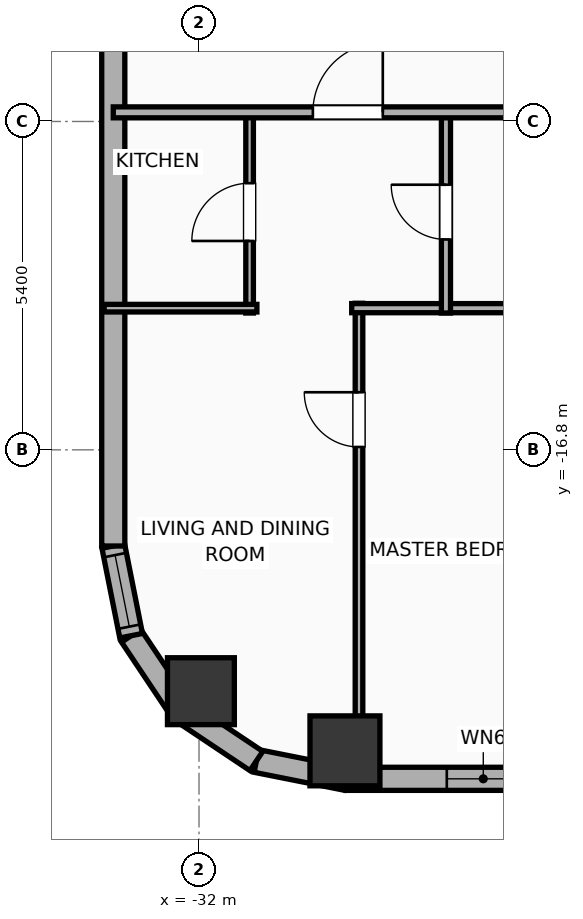
"""IFC4 building model, lengths in metres.
Left out: names, types, materials, properties, quantities, classifications, styles, units other than length and angle.
Written with IfcOpenShell. Run it as: python <this file> out.ifc"""

import sys

from ifc_helpers import new_model, si_unit, direction, frame, frame_2d, origin, origin_2d, place, context, subcontext, project, spatial, rectangle, hollow_rectangle, hollow_circle, extrude, element, fill, save


model = new_model("IFC4")
c1 = context("Model", 3, precision=1e-05, world=origin(), true_north=direction((0.0, 1.0)))
c2 = subcontext(c1, "Body", "Model", "MODEL_VIEW")
j1 = project(units=[si_unit("LENGTHUNIT", "METRE"), si_unit("PLANEANGLEUNIT", "RADIAN")], contexts=[c1])
p1 = place(None, origin())
s1 = spatial("IfcSite", under=j1, at=p1, CompositionType="ELEMENT")
p2 = place(p1, origin())
s2 = spatial("IfcBuilding", under=s1, at=p2, CompositionType="ELEMENT")
p3 = place(p2, frame((0.0, 0.0, 76.7)))
s3 = spatial("IfcBuildingStorey", under=s2, at=p3, CompositionType="ELEMENT", Elevation=76.7)
p4 = place(p3, frame((-29.6, -21.75, 0.0), z_axis=(0.0, 0.0, 1.0), x_axis=(1.0, 0.0, 0.0)))
e1 = element("IfcColumn", 1, at=p4, inside=s3, PredefinedType="COLUMN", context=c2, shape_type="SweptSolid", body=[
    extrude(hollow_rectangle(XDim=1.15, YDim=1.15, WallThickness=0.04, at=origin_2d()), origin(), (0.0, 0.0, 1.0), 3.9),
])
p5 = place(p3, frame((-31.969, -20.769, 0.0), z_axis=(0.0, 0.0, 1.0), x_axis=(1.0, 0.0, 0.0)))
e2 = element("IfcColumn", 2, at=p5, inside=s3, PredefinedType="COLUMN", context=c2, shape_type="SweptSolid", body=[
    extrude(hollow_circle(Radius=0.55, WallThickness=0.036, at=origin_2d()), origin(), (0.0, 0.0, 1.0), 3.9),
])
p6 = place(p3, frame((22.381, -22.21, 0.0), z_axis=(0.0, 0.0, 1.0), x_axis=(-1.0, 0.0, 0.0)))
e3 = element("IfcWall", 3, at=p6, inside=s3, PredefinedType="ELEMENTEDWALL", context=c2, shape_type="SweptSolid", body=[
    extrude(rectangle(XDim=51.963, YDim=0.38, at=frame_2d((25.981, 0.0))), origin(), (0.0, 0.0, 1.0), 3.6),
])
p7 = place(p6, frame((5.81, 0.0, 0.75)))
e4 = element("IfcOpeningElement", 4, at=p7, cuts=e3, PredefinedType="OPENING", context=c2, shape_type="SweptSolid", body=[
    extrude(rectangle(XDim=2.4, YDim=2.1, at=frame_2d((1.2, 1.05))), frame((0.0, 0.2, 0.0), z_axis=(0.0, -1.0, 0.0), x_axis=(1.0, 0.0, 0.0)), (0.0, 0.0, 1.0), 0.4),
])
p8 = place(p6, frame((49.106, 0.0, 0.75)))
e5 = element("IfcOpeningElement", 5, at=p8, cuts=e3, PredefinedType="OPENING", context=c2, shape_type="SweptSolid", body=[
    extrude(rectangle(XDim=1.2, YDim=2.05, at=frame_2d((0.6, 1.025))), frame((0.0, 0.2, 0.0), z_axis=(0.0, -1.0, 0.0), x_axis=(1.0, 0.0, 0.0)), (0.0, 0.0, 1.0), 0.4),
])
p9 = place(p6, frame((45.716, 0.0, 0.75)))
e6 = element("IfcOpeningElement", 6, at=p9, cuts=e3, PredefinedType="OPENING", context=c2, shape_type="SweptSolid", body=[
    extrude(rectangle(XDim=1.2, YDim=2.05, at=frame_2d((0.6, 1.025))), frame((0.0, 0.2, 0.0), z_axis=(0.0, -1.0, 0.0), x_axis=(1.0, 0.0, 0.0)), (0.0, 0.0, 1.0), 0.4),
])
p10 = place(p6, frame((42.346, 0.0, 0.75)))
e7 = element("IfcOpeningElement", 7, at=p10, cuts=e3, PredefinedType="OPENING", context=c2, shape_type="SweptSolid", body=[
    extrude(rectangle(XDim=1.2, YDim=2.05, at=frame_2d((0.6, 1.025))), frame((0.0, 0.2, 0.0), z_axis=(0.0, -1.0, 0.0), x_axis=(1.0, 0.0, 0.0)), (0.0, 0.0, 1.0), 0.4),
])
p11 = place(p6, frame((35.811, 0.0, 0.75)))
e8 = element("IfcOpeningElement", 8, at=p11, cuts=e3, PredefinedType="OPENING", context=c2, shape_type="SweptSolid", body=[
    extrude(rectangle(XDim=1.2, YDim=2.05, at=frame_2d((0.6, 1.025))), frame((0.0, 0.2, 0.0), z_axis=(0.0, -1.0, 0.0), x_axis=(1.0, 0.0, 0.0)), (0.0, 0.0, 1.0), 0.4),
])
p12 = place(p6, frame((39.061, 0.0, 0.75)))
e9 = element("IfcOpeningElement", 9, at=p12, cuts=e3, PredefinedType="OPENING", context=c2, shape_type="SweptSolid", body=[
    extrude(rectangle(XDim=1.2, YDim=2.05, at=frame_2d((0.6, 1.025))), frame((0.0, 0.2, 0.0), z_axis=(0.0, -1.0, 0.0), x_axis=(1.0, 0.0, 0.0)), (0.0, 0.0, 1.0), 0.4),
])
p13 = place(p6, frame((29.211, 0.0, 0.75)))
e10 = element("IfcOpeningElement", 10, at=p13, cuts=e3, PredefinedType="OPENING", context=c2, shape_type="SweptSolid", body=[
    extrude(rectangle(XDim=1.2, YDim=2.05, at=frame_2d((0.6, 1.025))), frame((0.0, 0.2, 0.0), z_axis=(0.0, -1.0, 0.0), x_axis=(1.0, 0.0, 0.0)), (0.0, 0.0, 1.0), 0.4),
])
p14 = place(p6, frame((22.757, 0.0, 0.75)))
e11 = element("IfcOpeningElement", 11, at=p14, cuts=e3, PredefinedType="OPENING", context=c2, shape_type="SweptSolid", body=[
    extrude(rectangle(XDim=1.2, YDim=2.05, at=frame_2d((0.6, 1.025))), frame((0.0, 0.2, 0.0), z_axis=(0.0, -1.0, 0.0), x_axis=(1.0, 0.0, 0.0)), (0.0, 0.0, 1.0), 0.4),
])
p15 = place(p6, frame((26.007, 0.0, 0.75)))
e12 = element("IfcOpeningElement", 12, at=p15, cuts=e3, PredefinedType="OPENING", context=c2, shape_type="SweptSolid", body=[
    extrude(rectangle(XDim=1.2, YDim=2.05, at=frame_2d((0.6, 1.025))), frame((0.0, 0.2, 0.0), z_axis=(0.0, -1.0, 0.0), x_axis=(1.0, 0.0, 0.0)), (0.0, 0.0, 1.0), 0.4),
])
p16 = place(p6, frame((18.697, 0.0, 0.75)))
e13 = element("IfcOpeningElement", 13, at=p16, cuts=e3, PredefinedType="OPENING", context=c2, shape_type="SweptSolid", body=[
    extrude(rectangle(XDim=1.2, YDim=2.05, at=frame_2d((0.6, 1.025))), frame((0.0, 0.2, 0.0), z_axis=(0.0, -1.0, 0.0), x_axis=(1.0, 0.0, 0.0)), (0.0, 0.0, 1.0), 0.4),
])
p17 = place(p6, frame((15.447, 0.0, 0.75)))
e14 = element("IfcOpeningElement", 14, at=p17, cuts=e3, PredefinedType="OPENING", context=c2, shape_type="SweptSolid", body=[
    extrude(rectangle(XDim=1.2, YDim=2.05, at=frame_2d((0.6, 1.025))), frame((0.0, 0.2, 0.0), z_axis=(0.0, -1.0, 0.0), x_axis=(1.0, 0.0, 0.0)), (0.0, 0.0, 1.0), 0.4),
])
p18 = place(p6, frame((11.162, 0.0, 0.75)))
e15 = element("IfcOpeningElement", 15, at=p18, cuts=e3, PredefinedType="OPENING", context=c2, shape_type="SweptSolid", body=[
    extrude(rectangle(XDim=1.2, YDim=2.05, at=frame_2d((0.6, 1.025))), frame((0.0, 0.2, 0.0), z_axis=(0.0, -1.0, 0.0), x_axis=(1.0, 0.0, 0.0)), (0.0, 0.0, 1.0), 0.4),
])
p19 = place(p6, frame((2.974, 0.0, 0.75)))
e16 = element("IfcOpeningElement", 16, at=p19, cuts=e3, PredefinedType="OPENING", context=c2, shape_type="SweptSolid", body=[
    extrude(rectangle(XDim=1.2, YDim=2.05, at=frame_2d((0.6, 1.025))), frame((0.0, 0.2, 0.0), z_axis=(0.0, -1.0, 0.0), x_axis=(1.0, 0.0, 0.0)), (0.0, 0.0, 1.0), 0.4),
])
p20 = place(p6, frame((0.927, 0.0, 0.75)))
e17 = element("IfcOpeningElement", 17, at=p20, cuts=e3, PredefinedType="OPENING", context=c2, shape_type="SweptSolid", body=[
    extrude(rectangle(XDim=1.2, YDim=2.05, at=frame_2d((0.6, 1.025))), frame((0.0, 0.2, 0.0), z_axis=(0.0, -1.0, 0.0), x_axis=(1.0, 0.0, 0.0)), (0.0, 0.0, 1.0), 0.4),
])
p21 = place(p3, frame((-29.581, -22.21, 0.0), z_axis=(0.0, 0.0, 1.0), x_axis=(-0.980786132421, 0.195086038585, 0.0)))
e18 = element("IfcWall", 18, at=p21, inside=s3, PredefinedType="ELEMENTEDWALL", context=c2, shape_type="SweptSolid", body=[
    extrude(rectangle(XDim=1.504, YDim=0.38, at=frame_2d((0.752, 0.0))), origin(), (0.0, 0.0, 1.0), 3.6),
])
p22 = place(p3, frame((-31.057, -21.917, 0.0), z_axis=(0.0, 0.0, 1.0), x_axis=(-0.831442848281, 0.555610286119, 0.0)))
e19 = element("IfcWall", 19, at=p22, inside=s3, PredefinedType="ELEMENTEDWALL", context=c2, shape_type="SweptSolid", body=[
    extrude(rectangle(XDim=1.485, YDim=0.38, at=frame_2d((0.743, 0.0))), origin(), (0.0, 0.0, 1.0), 3.6),
])
p23 = place(p3, frame((-32.292, -21.091, 0.0), z_axis=(0.0, 0.0, 1.0), x_axis=(-0.555572577804, 0.831468045563, 0.0)))
e20 = element("IfcWall", 20, at=p23, inside=s3, PredefinedType="ELEMENTEDWALL", context=c2, shape_type="SweptSolid", body=[
    extrude(rectangle(XDim=1.485, YDim=0.38, at=frame_2d((0.742, 0.0))), origin(), (0.0, 0.0, 1.0), 3.6),
])
p24 = place(p3, frame((-33.116, -19.857, 0.0), z_axis=(0.0, 0.0, 1.0), x_axis=(-0.195086038585, 0.980786132421, 0.0)))
e21 = element("IfcWall", 21, at=p24, inside=s3, PredefinedType="ELEMENTEDWALL", context=c2, shape_type="SweptSolid", body=[
    extrude(rectangle(XDim=1.504, YDim=0.38, at=frame_2d((0.752, 0.0))), origin(), (0.0, 0.0, 1.0), 3.6),
])
p25 = place(p24, frame((0.152, 0.0, 0.75)))
e22 = element("IfcOpeningElement", 22, at=p25, cuts=e21, PredefinedType="OPENING", context=c2, shape_type="SweptSolid", body=[
    extrude(rectangle(XDim=1.2, YDim=2.05, at=frame_2d((0.6, 1.025))), frame((0.0, 0.2, 0.0), z_axis=(0.0, -1.0, 0.0), x_axis=(1.0, 0.0, 0.0)), (0.0, 0.0, 1.0), 0.4),
])
p26 = place(p3, frame((-33.41, -18.381, 0.0), z_axis=(0.0, 0.0, 1.0), x_axis=(0.0, 1.0, 0.0)))
e23 = element("IfcWall", 23, at=p26, inside=s3, PredefinedType="ELEMENTEDWALL", context=c2, shape_type="SweptSolid", body=[
    extrude(rectangle(XDim=36.763, YDim=0.38, at=frame_2d((18.381, 0.0))), origin(), (0.0, 0.0, 1.0), 3.6),
])
p27 = place(p26, frame((33.762, 0.0, 0.75)))
e24 = element("IfcOpeningElement", 24, at=p27, cuts=e23, PredefinedType="OPENING", context=c2, shape_type="SweptSolid", body=[
    extrude(rectangle(XDim=1.2, YDim=2.05, at=frame_2d((0.6, 1.025))), frame((0.0, 0.2, 0.0), z_axis=(0.0, -1.0, 0.0), x_axis=(1.0, 0.0, 0.0)), (0.0, 0.0, 1.0), 0.4),
])
p28 = place(p26, frame((22.701, 0.0, 0.75)))
e25 = element("IfcOpeningElement", 25, at=p28, cuts=e23, PredefinedType="OPENING", context=c2, shape_type="SweptSolid", body=[
    extrude(rectangle(XDim=1.2, YDim=2.05, at=frame_2d((0.6, 1.025))), frame((0.0, 0.2, 0.0), z_axis=(0.0, -1.0, 0.0), x_axis=(1.0, 0.0, 0.0)), (0.0, 0.0, 1.0), 0.4),
])
p29 = place(p26, frame((13.001, 0.0, 0.75)))
e26 = element("IfcOpeningElement", 26, at=p29, cuts=e23, PredefinedType="OPENING", context=c2, shape_type="SweptSolid", body=[
    extrude(rectangle(XDim=1.2, YDim=2.05, at=frame_2d((0.6, 1.025))), frame((0.0, 0.2, 0.0), z_axis=(0.0, -1.0, 0.0), x_axis=(1.0, 0.0, 0.0)), (0.0, 0.0, 1.0), 0.4),
])
p30 = place(p3, frame((-29.369, -22.36, 0.0), z_axis=(0.0, 0.0, 1.0), x_axis=(0.0, 1.0, 0.0)))
e27 = element("IfcWall", 27, at=p30, inside=s3, PredefinedType="PARTITIONING", context=c2, shape_type="SweptSolid", body=[
    extrude(rectangle(XDim=7.97, YDim=0.125, at=frame_2d((3.985, 0.0))), origin(), (0.0, 0.0, 1.0), 3.6),
])
p31 = place(p30, frame((5.607, 0.0, 0.0)))
e28 = element("IfcOpeningElement", 28, at=p31, cuts=e27, PredefinedType="OPENING", context=c2, shape_type="SweptSolid", body=[
    extrude(rectangle(XDim=0.9, YDim=2.05, at=frame_2d((0.45, 1.025))), frame((0.0, 0.073, 0.0), z_axis=(0.0, -1.0, 0.0), x_axis=(1.0, 0.0, 0.0)), (0.0, 0.0, 1.0), 0.145),
])
p32 = place(p3, frame((-29.489, -14.47, 0.0), z_axis=(0.0, 0.0, 1.0), x_axis=(1.0, 0.0, 0.0)))
e29 = element("IfcWall", 29, at=p32, inside=s3, PredefinedType="PLUMBINGWALL", context=c2, shape_type="SweptSolid", body=[
    extrude(rectangle(XDim=3.605, YDim=0.15, at=frame_2d((1.802, 0.0))), origin(), (0.0, 0.0, 1.0), 3.6),
])
p33 = place(p3, frame((-31.168, -14.55, 0.0), z_axis=(0.0, 0.0, 1.0), x_axis=(0.0, 1.0, 0.0)))
e30 = element("IfcWall", 30, at=p33, inside=s3, PredefinedType="PARTITIONING", context=c2, shape_type="SweptSolid", body=[
    extrude(rectangle(XDim=3.32, YDim=0.125, at=frame_2d((1.66, 0.0))), origin(), (0.0, 0.0, 1.0), 2.89),
])
p34 = place(p33, frame((1.185, 0.0, 0.0)))
e31 = element("IfcOpeningElement", 31, at=p34, cuts=e30, PredefinedType="OPENING", context=c2, shape_type="SweptSolid", body=[
    extrude(rectangle(XDim=0.95, YDim=2.05, at=frame_2d((0.475, 1.025))), frame((0.0, 0.073, 0.0), z_axis=(0.0, -1.0, 0.0), x_axis=(1.0, 0.0, 0.0)), (0.0, 0.0, 1.0), 0.145),
])
p35 = place(p3, frame((-33.56, -14.47, 0.0), z_axis=(0.0, 0.0, 1.0), x_axis=(1.0, 0.0, 0.0)))
e32 = element("IfcWall", 32, at=p35, inside=s3, PredefinedType="PARTITIONING", context=c2, shape_type="SweptSolid", body=[
    extrude(rectangle(XDim=2.512, YDim=0.125, at=frame_2d((1.256, 0.0))), origin(), (0.0, 0.0, 1.0), 3.6),
])
p36 = place(p3, frame((-27.939, -14.55, 0.0), z_axis=(0.0, 0.0, 1.0), x_axis=(0.0, 1.0, 0.0)))
e33 = element("IfcWall", 33, at=p36, inside=s3, PredefinedType="PLUMBINGWALL", context=c2, shape_type="SweptSolid", body=[
    extrude(rectangle(XDim=3.32, YDim=0.15, at=frame_2d((1.66, 0.0))), origin(), (0.0, 0.0, 1.0), 3.6),
])
p37 = place(p36, frame((1.21, 0.0, 0.0)))
e34 = element("IfcOpeningElement", 34, at=p37, cuts=e33, PredefinedType="OPENING", context=c2, shape_type="SweptSolid", body=[
    extrude(rectangle(XDim=0.9, YDim=2.05, at=frame_2d((0.45, 1.025))), frame((0.0, 0.085, 0.0), z_axis=(0.0, -1.0, 0.0), x_axis=(1.0, 0.0, 0.0)), (0.0, 0.0, 1.0), 0.17),
])
p38 = place(p3, frame((-33.41, -11.25, 0.0), z_axis=(0.0, 0.0, 1.0), x_axis=(1.0, 0.0, 0.0)))
e35 = element("IfcWall", 35, at=p38, inside=s3, PredefinedType="PARTITIONING", context=c2, shape_type="SweptSolid", body=[
    extrude(rectangle(XDim=59.62, YDim=0.18, at=frame_2d((29.81, 0.0))), origin(), (0.0, 0.0, 1.0), 3.6),
])
p39 = place(p38, frame((3.282, 0.0, 0.0)))
e36 = element("IfcOpeningElement", 36, at=p39, cuts=e35, PredefinedType="OPENING", context=c2, shape_type="SweptSolid", body=[
    extrude(rectangle(XDim=1.15, YDim=2.05, at=frame_2d((0.575, 1.025))), frame((0.0, 0.1, 0.0), z_axis=(0.0, -1.0, 0.0), x_axis=(1.0, 0.0, 0.0)), (0.0, 0.0, 1.0), 0.2),
])
p40 = place(p38, frame((10.771, 0.0, 0.0)))
e37 = element("IfcOpeningElement", 37, at=p40, cuts=e35, PredefinedType="OPENING", context=c2, shape_type="SweptSolid", body=[
    extrude(rectangle(XDim=1.15, YDim=2.05, at=frame_2d((0.575, 1.025))), frame((0.0, 0.1, 0.0), z_axis=(0.0, -1.0, 0.0), x_axis=(1.0, 0.0, 0.0)), (0.0, 0.0, 1.0), 0.2),
])
p41 = place(p38, frame((18.778, 0.0, 0.0)))
e38 = element("IfcOpeningElement", 38, at=p41, cuts=e35, PredefinedType="OPENING", context=c2, shape_type="SweptSolid", body=[
    extrude(rectangle(XDim=1.15, YDim=2.05, at=frame_2d((0.575, 1.025))), frame((0.0, 0.1, 0.0), z_axis=(0.0, -1.0, 0.0), x_axis=(1.0, 0.0, 0.0)), (0.0, 0.0, 1.0), 0.2),
])
p42 = place(p38, frame((24.34, 0.0, 0.0)))
e39 = element("IfcOpeningElement", 39, at=p42, cuts=e35, PredefinedType="OPENING", context=c2, shape_type="SweptSolid", body=[
    extrude(rectangle(XDim=0.9, YDim=2.05, at=frame_2d((0.45, 1.025))), frame((0.0, 0.1, 0.0), z_axis=(0.0, -1.0, 0.0), x_axis=(1.0, 0.0, 0.0)), (0.0, 0.0, 1.0), 0.2),
])
p43 = place(p38, frame((31.829, 0.0, 0.0)))
e40 = element("IfcOpeningElement", 40, at=p43, cuts=e35, PredefinedType="OPENING", context=c2, shape_type="SweptSolid", body=[
    extrude(rectangle(XDim=1.15, YDim=2.05, at=frame_2d((0.575, 1.025))), frame((0.0, 0.1, 0.0), z_axis=(0.0, -1.0, 0.0), x_axis=(1.0, 0.0, 0.0)), (0.0, 0.0, 1.0), 0.2),
])
p44 = place(p38, frame((35.948, 0.0, 0.0)))
e41 = element("IfcOpeningElement", 41, at=p44, cuts=e35, PredefinedType="OPENING", context=c2, shape_type="SweptSolid", body=[
    extrude(rectangle(XDim=1.15, YDim=2.05, at=frame_2d((0.575, 1.025))), frame((0.0, 0.1, 0.0), z_axis=(0.0, -1.0, 0.0), x_axis=(1.0, 0.0, 0.0)), (0.0, 0.0, 1.0), 0.2),
])
p45 = place(p38, frame((43.705, 0.0, 0.0)))
e42 = element("IfcOpeningElement", 42, at=p45, cuts=e35, PredefinedType="OPENING", context=c2, shape_type="SweptSolid", body=[
    extrude(rectangle(XDim=0.9, YDim=2.05, at=frame_2d((0.45, 1.025))), frame((0.0, 0.1, 0.0), z_axis=(0.0, -1.0, 0.0), x_axis=(1.0, 0.0, 0.0)), (0.0, 0.0, 1.0), 0.2),
])
p46 = place(p38, frame((48.552, 0.0, 0.0)))
e43 = element("IfcOpeningElement", 43, at=p46, cuts=e35, PredefinedType="OPENING", context=c2, shape_type="SweptSolid", body=[
    extrude(rectangle(XDim=1.15, YDim=2.05, at=frame_2d((0.575, 1.025))), frame((0.0, 0.1, 0.0), z_axis=(0.0, -1.0, 0.0), x_axis=(1.0, 0.0, 0.0)), (0.0, 0.0, 1.0), 0.2),
])
p47 = place(p38, frame((56.213, 0.0, 0.0)))
e44 = element("IfcOpeningElement", 44, at=p47, cuts=e35, PredefinedType="OPENING", context=c2, shape_type="SweptSolid", body=[
    extrude(rectangle(XDim=0.9, YDim=2.05, at=frame_2d((0.45, 1.025))), frame((0.0, 0.1, 0.0), z_axis=(0.0, -1.0, 0.0), x_axis=(1.0, 0.0, 0.0)), (0.0, 0.0, 1.0), 0.2),
])
p48 = place(p25, origin())
e45 = element("IfcWindow", 45, at=p48, inside=s3, PartitioningType="SINGLE_PANEL", PredefinedType="WINDOW", context=c2, shape_type="SweptSolid", body=[
    extrude(rectangle(XDim=1.2, YDim=2.05, at=frame_2d((0.6, 1.025))), frame((0.0, 0.03, 0.0), z_axis=(0.0, -1.0, 0.0), x_axis=(1.0, 0.0, 0.0)), (0.0, 0.0, 1.0), 0.06),
])
fill(e22, e45)
p49 = place(p8, origin())
e46 = element("IfcWindow", 46, at=p49, inside=s3, PartitioningType="SINGLE_PANEL", PredefinedType="WINDOW", context=c2, shape_type="SweptSolid", body=[
    extrude(rectangle(XDim=1.2, YDim=2.05, at=frame_2d((0.6, 1.025))), frame((0.0, 0.03, 0.0), z_axis=(0.0, -1.0, 0.0), x_axis=(1.0, 0.0, 0.0)), (0.0, 0.0, 1.0), 0.06),
])
fill(e5, e46)
p50 = place(p31, origin())
e47 = element("IfcDoor", 47, at=p50, inside=s3, OperationType="SINGLE_SWING_RIGHT", PredefinedType="DOOR", context=c2, shape_type="SweptSolid", body=[
    extrude(rectangle(XDim=0.9, YDim=2.05, at=frame_2d((0.45, 1.025))), frame((0.0, 0.025, 0.0), z_axis=(0.0, -1.0, 0.0), x_axis=(1.0, 0.0, 0.0)), (0.0, 0.0, 1.0), 0.05),
])
fill(e28, e47)
p51 = place(p34, origin())
e48 = element("IfcDoor", 48, at=p51, inside=s3, OperationType="SINGLE_SWING_LEFT", PredefinedType="DOOR", context=c2, shape_type="SweptSolid", body=[
    extrude(rectangle(XDim=0.95, YDim=2.05, at=frame_2d((0.475, 1.025))), frame((0.0, 0.025, 0.0), z_axis=(0.0, -1.0, 0.0), x_axis=(1.0, 0.0, 0.0)), (0.0, 0.0, 1.0), 0.05),
])
fill(e31, e48)
p52 = place(p37, origin())
e49 = element("IfcDoor", 49, at=p52, inside=s3, OperationType="SINGLE_SWING_RIGHT", PredefinedType="DOOR", context=c2, shape_type="SweptSolid", body=[
    extrude(rectangle(XDim=0.9, YDim=2.05, at=frame_2d((0.45, 1.025))), frame((0.0, 0.025, 0.0), z_axis=(0.0, -1.0, 0.0), x_axis=(1.0, 0.0, 0.0)), (0.0, 0.0, 1.0), 0.05),
])
fill(e34, e49)
p53 = place(p39, origin())
e50 = element("IfcDoor", 50, at=p53, inside=s3, OperationType="SINGLE_SWING_RIGHT", PredefinedType="DOOR", context=c2, shape_type="SweptSolid", body=[
    extrude(rectangle(XDim=1.15, YDim=2.05, at=frame_2d((0.575, 1.025))), frame((0.0, 0.025, 0.0), z_axis=(0.0, -1.0, 0.0), x_axis=(1.0, 0.0, 0.0)), (0.0, 0.0, 1.0), 0.05),
])
fill(e36, e50)
save(model, sys.argv[1])
